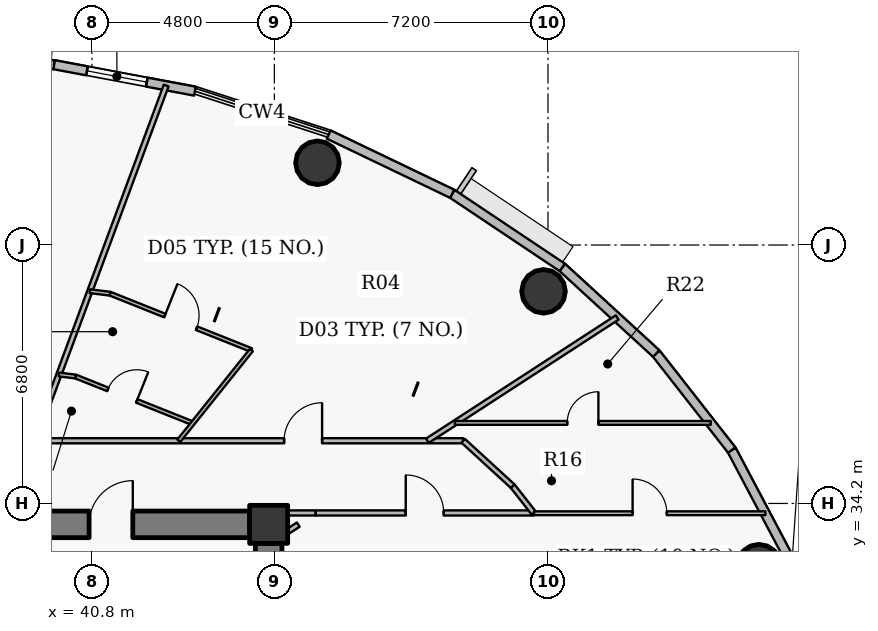
"""IFC4 building model, lengths in metres.
Left out: names, types, materials, properties, quantities, classifications, styles, units other than length and angle.
Written with IfcOpenShell. Run it as: python <this file> out.ifc"""

import sys

from ifc_helpers import new_model, si_unit, direction, frame, frame_2d, origin, origin_2d, place, context, subcontext, project, spatial, rectangle, hollow_circle, extrude, source, transform, mapped, element, fill, save


model = new_model("IFC4")
c1 = context("Model", 3, precision=1e-05, world=origin(), true_north=direction((0.0, 1.0)))
c2 = subcontext(c1, "Body", "Model", "MODEL_VIEW")
j1 = project(units=[si_unit("LENGTHUNIT", "METRE"), si_unit("PLANEANGLEUNIT", "RADIAN")], contexts=[c1])
p1 = place(None, origin())
s1 = spatial("IfcSite", under=j1, at=p1, CompositionType="ELEMENT")
p2 = place(p1, origin())
s2 = spatial("IfcBuilding", under=s1, at=p2, CompositionType="ELEMENT")
p3 = place(p2, frame((0.0, 0.0, 214.05)))
s3 = spatial("IfcBuildingStorey", under=s2, at=p3, CompositionType="ELEMENT", Elevation=214.05)
p4 = place(p3, frame((45.45, 33.65, 0.0), z_axis=(0.0, 0.0, 1.0), x_axis=(1.0, 0.0, 0.0)))
e1 = element("IfcColumn", 1, at=p4, inside=s3, PredefinedType="COLUMN", context=c2, shape_type="SweptSolid", body=[
    extrude(rectangle(XDim=1.0, YDim=1.0, at=origin_2d()), origin(), (0.0, 0.0, 1.0), 3.75),
])
p5 = place(p3, frame((27.05, 33.65, 0.0), z_axis=(0.0, 0.0, 1.0), x_axis=(1.0, 0.0, 0.0)))
e2 = element("IfcWall", 2, at=p5, inside=s3, PredefinedType="SHEAR", context=c2, shape_type="SweptSolid", body=[
    extrude(rectangle(XDim=17.9, YDim=0.7, at=frame_2d((8.95, 0.0))), origin(), (0.0, 0.0, 1.0), 3.05),
])
p6 = place(p5, frame((13.675, 0.0, 0.0)))
e3 = element("IfcOpeningElement", 3, at=p6, cuts=e2, PredefinedType="OPENING", context=c2, shape_type="SweptSolid", body=[
    extrude(rectangle(XDim=1.15, YDim=2.15, at=origin_2d()), frame((0.575, 0.36, 1.075), z_axis=(0.0, -1.0, 0.0), x_axis=(1.0, 0.0, 0.0)), (0.0, 0.0, 1.0), 0.72),
])
p7 = place(p3, frame((45.45, 33.15, 0.0), z_axis=(0.0, 0.0, 1.0), x_axis=(0.0, -1.0, 0.0)))
e4 = element("IfcWall", 4, at=p7, inside=s3, PredefinedType="SHEAR", context=c2, shape_type="SweptSolid", body=[
    extrude(rectangle(XDim=12.3, YDim=0.7, at=frame_2d((6.15, 0.0))), origin(), (0.0, 0.0, 1.0), 3.05),
])
for number, where, z_axis, x_axis in (
    (5, (58.351, 32.549, 0.0), (0.0, 0.0, 1.0), (1.0, 0.0, 0.0)),
    (6, (52.683, 39.781, 0.0), (0.0, 0.0, 1.0), (1.0, 0.0, 0.0)),
    (7, (46.735, 43.164, 0.0), (0.0, 0.0, 1.0), (1.0, 0.0, 0.0)),
):
    element("IfcColumn", number, at=place(p3, frame(where, z_axis=z_axis, x_axis=x_axis)), inside=s3, PredefinedType="COLUMN", context=c2, shape_type="SweptSolid", body=[
        extrude(hollow_circle(Radius=0.575, WallThickness=0.036, at=origin_2d()), origin(), (0.0, 0.0, 1.0), 3.75),
    ])
p8 = place(p3, frame((57.636, 35.605, 0.0), z_axis=(0.0, 0.0, 1.0), x_axis=(0.46766049993, -0.883908172157, 0.0)))
e8 = element("IfcWall", 8, at=p8, inside=s3, PredefinedType="SOLIDWALL", context=c2, shape_type="SweptSolid", body=[
    extrude(rectangle(XDim=3.11, YDim=0.24, at=frame_2d((1.555, 0.0))), origin(), (0.0, 0.0, 1.0), 3.5),
])
p9 = place(p3, frame((55.648, 38.145, 0.0), z_axis=(0.0, 0.0, 1.0), x_axis=(0.616312344705, -0.787501805562, 0.0)))
e9 = element("IfcWall", 9, at=p9, inside=s3, PredefinedType="SOLIDWALL", context=c2, shape_type="SweptSolid", body=[
    extrude(rectangle(XDim=3.225, YDim=0.24, at=frame_2d((1.612, 0.0))), origin(), (0.0, 0.0, 1.0), 3.5),
])
p10 = place(p3, frame((53.176, 40.411, 0.0), z_axis=(0.0, 0.0, 1.0), x_axis=(0.737123922599, -0.675757591694, 0.0)))
e10 = element("IfcWall", 10, at=p10, inside=s3, PredefinedType="SOLIDWALL", context=c2, shape_type="SweptSolid", body=[
    extrude(rectangle(XDim=3.354, YDim=0.24, at=frame_2d((1.677, 0.0))), origin(), (0.0, 0.0, 1.0), 3.5),
])
p11 = place(p3, frame((50.28, 42.348, 0.0), z_axis=(0.0, 0.0, 1.0), x_axis=(0.831262496074, -0.555880079352, 0.0)))
e11 = element("IfcWall", 11, at=p11, inside=s3, PredefinedType="SOLIDWALL", context=c2, shape_type="SweptSolid", body=[
    extrude(rectangle(XDim=3.484, YDim=0.24, at=frame_2d((1.742, 0.0))), origin(), (0.0, 0.0, 1.0), 3.5),
])
p12 = place(p3, frame((47.031, 43.906, 0.0), z_axis=(0.0, 0.0, 1.0), x_axis=(0.901598104751, -0.432574684313, 0.0)))
e12 = element("IfcWall", 12, at=p12, inside=s3, PredefinedType="SOLIDWALL", context=c2, shape_type="SweptSolid", body=[
    extrude(rectangle(XDim=3.604, YDim=0.24, at=frame_2d((1.802, 0.0))), origin(), (0.0, 0.0, 1.0), 3.5),
])
p13 = place(p3, frame((39.802, 45.746, 0.0), z_axis=(0.0, 0.0, 1.0), x_axis=(0.982784898575, -0.184753465822, 0.0)))
e13 = element("IfcWall", 13, at=p13, inside=s3, PredefinedType="SOLIDWALL", context=c2, shape_type="SweptSolid", body=[
    extrude(rectangle(XDim=3.773, YDim=0.24, at=frame_2d((1.886, 0.0))), origin(), (0.0, 0.0, 1.0), 3.5),
])
p14 = place(p13, frame((0.884, 0.0, 0.9)))
e14 = element("IfcOpeningElement", 14, at=p14, cuts=e13, PredefinedType="OPENING", context=c2, shape_type="SweptSolid", body=[
    extrude(rectangle(XDim=1.6, YDim=1.75, at=origin_2d()), frame((0.8, 0.13, 0.875), z_axis=(0.0, -1.0, 0.0), x_axis=(1.0, 0.0, 0.0)), (0.0, 0.0, 1.0), 0.26),
])
p15 = place(p3, frame((36.0, 45.98, 0.0), z_axis=(0.0, 0.0, 1.0), x_axis=(0.998108785312, -0.06147237333, 0.0)))
e15 = element("IfcWall", 15, at=p15, inside=s3, PredefinedType="SOLIDWALL", context=c2, shape_type="SweptSolid", body=[
    extrude(rectangle(XDim=3.809, YDim=0.24, at=frame_2d((1.904, 0.0))), origin(), (0.0, 0.0, 1.0), 3.5),
])
p16 = place(p15, frame((1.379, 0.0, 0.0)))
e16 = element("IfcOpeningElement", 16, at=p16, cuts=e15, PredefinedType="OPENING", context=c2, shape_type="SweptSolid", body=[
    extrude(rectangle(XDim=1.05, YDim=2.15, at=origin_2d()), frame((0.525, 0.13, 1.075), z_axis=(0.0, -1.0, 0.0), x_axis=(1.0, 0.0, 0.0)), (0.0, 0.0, 1.0), 0.26),
])
p17 = place(p3, frame((24.35, 35.85, 0.0), z_axis=(0.0, 0.0, 1.0), x_axis=(1.0, 0.0, 0.0)))
e17 = element("IfcWall", 17, at=p17, inside=s3, PredefinedType="PARTITIONING", context=c2, shape_type="SweptSolid", body=[
    extrude(rectangle(XDim=26.218, YDim=0.135, at=frame_2d((13.109, 0.0))), origin(), (0.0, 0.0, 1.0), 2.935),
])
p18 = place(p17, frame((21.507, 0.0, 0.0)))
e18 = element("IfcOpeningElement", 18, at=p18, cuts=e17, PredefinedType="OPENING", context=c2, shape_type="SweptSolid", body=[
    extrude(rectangle(XDim=1.0, YDim=2.15, at=origin_2d()), frame((0.5, 0.078, 1.075), z_axis=(0.0, -1.0, 0.0), x_axis=(1.0, 0.0, 0.0)), (0.0, 0.0, 1.0), 0.155),
])
p19 = place(p17, frame((12.95, 0.0, 0.0)))
e19 = element("IfcOpeningElement", 19, at=p19, cuts=e17, PredefinedType="OPENING", context=c2, shape_type="SweptSolid", body=[
    extrude(rectangle(XDim=1.0, YDim=2.15, at=origin_2d()), frame((0.5, 0.078, 1.075), z_axis=(0.0, -1.0, 0.0), x_axis=(1.0, 0.0, 0.0)), (0.0, 0.0, 1.0), 0.155),
])
p20 = place(p17, frame((2.293, 0.0, 0.0)))
e20 = element("IfcOpeningElement", 20, at=p20, cuts=e17, PredefinedType="OPENING", context=c2, shape_type="SweptSolid", body=[
    extrude(rectangle(XDim=1.0, YDim=2.15, at=origin_2d()), frame((0.5, 0.078, 1.075), z_axis=(0.0, -1.0, 0.0), x_axis=(1.0, 0.0, 0.0)), (0.0, 0.0, 1.0), 0.155),
])
p21 = place(p3, frame((39.285, 35.85, 0.0), z_axis=(0.0, 0.0, 1.0), x_axis=(0.347978689674, 0.937502443481, 0.0)))
e21 = element("IfcWall", 21, at=p21, inside=s3, PredefinedType="PARTITIONING", context=c2, shape_type="SweptSolid", body=[
    extrude(rectangle(XDim=9.969, YDim=0.135, at=frame_2d((4.984, 0.0))), origin(), (0.0, 0.0, 1.0), 2.985),
])
p22 = place(p3, frame((39.932, 37.593, 0.0), z_axis=(0.0, 0.0, 1.0), x_axis=(0.992412401992, -0.122953748919, 0.0)))
e22 = element("IfcWall", 22, at=p22, inside=s3, PredefinedType="PARTITIONING", context=c2, shape_type="SweptSolid", body=[
    extrude(rectangle(XDim=0.445, YDim=0.1, at=frame_2d((0.222, 0.0))), origin(), (0.0, 0.0, 1.0), 3.5),
])
p23 = place(p3, frame((40.373, 37.539, 0.0), z_axis=(0.0, 0.0, 1.0), x_axis=(0.928801257211, -0.370578230071, 0.0)))
e23 = element("IfcWall", 23, at=p23, inside=s3, PredefinedType="PARTITIONING", context=c2, shape_type="SweptSolid", body=[
    extrude(rectangle(XDim=3.316, YDim=0.1, at=frame_2d((1.658, 0.0))), origin(), (0.0, 0.0, 1.0), 2.935),
])
p24 = place(p23, frame((0.91, 0.0, 0.0)))
e24 = element("IfcOpeningElement", 24, at=p24, cuts=e23, PredefinedType="OPENING", context=c2, shape_type="SweptSolid", body=[
    extrude(rectangle(XDim=0.82, YDim=2.1, at=origin_2d()), frame((0.41, 0.06, 1.05), z_axis=(0.0, -1.0, 0.0), x_axis=(1.0, 0.0, 0.0)), (0.0, 0.0, 1.0), 0.12),
])
p25 = place(p3, frame((40.745, 39.785, 0.0), z_axis=(0.0, 0.0, 1.0), x_axis=(0.992431053699, -0.122803109303, 0.0)))
e25 = element("IfcWall", 25, at=p25, inside=s3, PredefinedType="PARTITIONING", context=c2, shape_type="SweptSolid", body=[
    extrude(rectangle(XDim=0.537, YDim=0.1, at=frame_2d((0.269, 0.0))), origin(), (0.0, 0.0, 1.0), 3.5),
])
p26 = place(p3, frame((41.278, 39.719, 0.0), z_axis=(0.0, 0.0, 1.0), x_axis=(0.928808650267, -0.3705596999, 0.0)))
e26 = element("IfcWall", 26, at=p26, inside=s3, PredefinedType="PARTITIONING", context=c2, shape_type="SweptSolid", body=[
    extrude(rectangle(XDim=4.002, YDim=0.1, at=frame_2d((2.001, 0.0))), origin(), (0.0, 0.0, 1.0), 2.935),
])
p27 = place(p26, frame((1.551, 0.0, 0.0)))
e27 = element("IfcOpeningElement", 27, at=p27, cuts=e26, PredefinedType="OPENING", context=c2, shape_type="SweptSolid", body=[
    extrude(rectangle(XDim=0.9, YDim=2.1, at=origin_2d()), frame((0.45, 0.06, 1.05), z_axis=(0.0, -1.0, 0.0), x_axis=(1.0, 0.0, 0.0)), (0.0, 0.0, 1.0), 0.12),
])
p28 = place(p3, frame((43.085, 35.85, 0.0), z_axis=(0.0, 0.0, 1.0), x_axis=(0.62500673738, 0.780619355531, 0.0)))
e28 = element("IfcWall", 28, at=p28, inside=s3, PredefinedType="PARTITIONING", context=c2, shape_type="SweptSolid", body=[
    extrude(rectangle(XDim=3.056, YDim=0.1, at=frame_2d((1.528, 0.0))), origin(), (0.0, 0.0, 1.0), 3.5),
])
p29 = place(p3, frame((46.691, 33.95, 0.0), z_axis=(0.0, 0.0, 1.0), x_axis=(1.0, 0.0, 0.0)))
e29 = element("IfcWall", 29, at=p29, inside=s3, PredefinedType="PARTITIONING", context=c2, shape_type="SweptSolid", body=[
    extrude(rectangle(XDim=5.733, YDim=0.135, at=frame_2d((2.866, 0.0))), origin(), (0.0, 0.0, 1.0), 3.5),
])
p30 = place(p29, frame((2.366, 0.0, 0.0)))
e30 = element("IfcOpeningElement", 30, at=p30, cuts=e29, PredefinedType="OPENING", context=c2, shape_type="SweptSolid", body=[
    extrude(rectangle(XDim=1.0, YDim=2.15, at=origin_2d()), frame((0.5, 0.078, 1.075), z_axis=(0.0, -1.0, 0.0), x_axis=(1.0, 0.0, 0.0)), (0.0, 0.0, 1.0), 0.155),
])
p31 = place(p3, frame((49.628, 35.85, 0.0), z_axis=(0.0, 0.0, 1.0), x_axis=(0.838688976762, 0.544610686875, 0.0)))
e31 = element("IfcWall", 31, at=p31, inside=s3, PredefinedType="PARTITIONING", context=c2, shape_type="SweptSolid", body=[
    extrude(rectangle(XDim=5.954, YDim=0.135, at=frame_2d((2.977, 0.0))), origin(), (0.0, 0.0, 1.0), 2.985),
])
p32 = place(p3, frame((50.351, 36.319, 0.0), z_axis=(0.0, 0.0, 1.0), x_axis=(1.0, 0.0, 0.0)))
e32 = element("IfcWall", 32, at=p32, inside=s3, PredefinedType="PARTITIONING", context=c2, shape_type="SweptSolid", body=[
    extrude(rectangle(XDim=6.733, YDim=0.1, at=frame_2d((3.366, 0.0))), origin(), (0.0, 0.0, 1.0), 2.985),
])
p33 = place(p32, frame((2.956, 0.0, 0.0)))
e33 = element("IfcOpeningElement", 33, at=p33, cuts=e32, PredefinedType="OPENING", context=c2, shape_type="SweptSolid", body=[
    extrude(rectangle(XDim=0.82, YDim=2.1, at=origin_2d()), frame((0.41, 0.06, 1.05), z_axis=(0.0, -1.0, 0.0), x_axis=(1.0, 0.0, 0.0)), (0.0, 0.0, 1.0), 0.12),
])
p34 = place(p3, frame((50.568, 35.85, 0.0), z_axis=(0.0, 0.0, 1.0), x_axis=(0.737102657331, -0.675780787353, 0.0)))
e34 = element("IfcWall", 34, at=p34, inside=s3, PredefinedType="PARTITIONING", context=c2, shape_type="SweptSolid", body=[
    extrude(rectangle(XDim=1.772, YDim=0.135, at=frame_2d((0.886, 0.0))), origin(), (0.0, 0.0, 1.0), 3.5),
])
p35 = place(p3, frame((51.874, 34.653, 0.0), z_axis=(0.0, 0.0, 1.0), x_axis=(0.61628613448, -0.787522317429, 0.0)))
e35 = element("IfcWall", 35, at=p35, inside=s3, PredefinedType="PARTITIONING", context=c2, shape_type="SweptSolid", body=[
    extrude(rectangle(XDim=0.893, YDim=0.135, at=frame_2d((0.446, 0.0))), origin(), (0.0, 0.0, 1.0), 3.5),
])
p36 = place(p3, frame((52.434, 33.943, 0.0), z_axis=(0.0, 0.0, 1.0), x_axis=(1.0, 0.0, 0.0)))
e36 = element("IfcWall", 36, at=p36, inside=s3, PredefinedType="PARTITIONING", context=c2, shape_type="SweptSolid", body=[
    extrude(rectangle(XDim=6.087, YDim=0.1, at=frame_2d((3.043, 0.0))), origin(), (0.0, 0.0, 1.0), 2.985),
])
p37 = place(p36, frame((2.594, 0.0, 0.0)))
e37 = element("IfcOpeningElement", 37, at=p37, cuts=e36, PredefinedType="OPENING", context=c2, shape_type="SweptSolid", body=[
    extrude(rectangle(XDim=0.9, YDim=2.1, at=origin_2d()), frame((0.45, 0.06, 1.05), z_axis=(0.0, -1.0, 0.0), x_axis=(1.0, 0.0, 0.0)), (0.0, 0.0, 1.0), 0.12),
])
p38 = place(p3, frame((46.681, 33.95, 0.0), z_axis=(0.0, 0.0, 1.0), x_axis=(-1.0, 0.0, 0.0)))
e38 = element("IfcWall", 38, at=p38, inside=s3, PredefinedType="PARTITIONING", context=c2, shape_type="SweptSolid", body=[
    extrude(rectangle(XDim=0.881, YDim=0.135, at=frame_2d((0.44, 0.0))), origin(), (0.0, 0.0, 1.0), 3.5),
])
p39 = place(p3, frame((45.79, 34.0, 0.0), z_axis=(0.0, 0.0, 1.0), x_axis=(-1.0, 0.0, 0.0)))
e39 = element("IfcWall", 39, at=p39, inside=s3, PredefinedType="PARTITIONING", context=c2, shape_type="SweptSolid", body=[
    extrude(rectangle(XDim=0.83, YDim=0.135, at=frame_2d((0.415, 0.0))), origin(), (0.0, 0.0, 1.0), 2.935),
])
p40 = place(p3, frame((45.8, 33.364, 0.0), z_axis=(0.0, 0.0, 1.0), x_axis=(0.838607336961, 0.544736389821, 0.0)))
e40 = element("IfcWall", 40, at=p40, inside=s3, PredefinedType="PARTITIONING", context=c2, shape_type="SweptSolid", body=[
    extrude(rectangle(XDim=0.511, YDim=0.135, at=frame_2d((0.255, 0.0))), origin(), (0.0, 0.0, 1.0), 3.5),
])
m1 = source(origin(), c2, "Body", "SweptSolid", [
    extrude(rectangle(XDim=1.6, YDim=1.75, at=origin_2d()), frame((0.8, 0.03, 0.875), z_axis=(0.0, -1.0, 0.0), x_axis=(1.0, 0.0, 0.0)), (0.0, 0.0, 1.0), 0.06),
])
p41 = place(p14, origin())
e41 = element("IfcWindow", 41, at=p41, inside=s3, PartitioningType="DOUBLE_PANEL_VERTICAL", PredefinedType="WINDOW", context=c2, shape_type="MappedRepresentation", body=[
    mapped(m1, transform((0.0, 0.0, 0.0), x_axis=(1.0, 0.0, 0.0), y_axis=(0.0, 1.0, 0.0), z_axis=(0.0, 0.0, 1.0), scale=1.0)),
])
fill(e14, e41)
m2 = source(origin(), c2, "Body", "SweptSolid", [
    extrude(rectangle(XDim=1.15, YDim=2.15, at=origin_2d()), frame((0.575, 0.025, 1.075), z_axis=(0.0, -1.0, 0.0), x_axis=(1.0, 0.0, 0.0)), (0.0, 0.0, 1.0), 0.05),
])
p42 = place(p6, origin())
e42 = element("IfcDoor", 42, at=p42, inside=s3, OperationType="SINGLE_SWING_RIGHT", PredefinedType="DOOR", context=c2, shape_type="MappedRepresentation", body=[
    mapped(m2, transform((0.0, 0.0, 0.0), x_axis=(1.0, 0.0, 0.0), y_axis=(0.0, 1.0, 0.0), z_axis=(0.0, 0.0, 1.0), scale=1.0)),
])
fill(e3, e42)
m3 = source(origin(), c2, "Body", "SweptSolid", [
    extrude(rectangle(XDim=1.0, YDim=2.15, at=origin_2d()), frame((0.5, 0.025, 1.075), z_axis=(0.0, -1.0, 0.0), x_axis=(1.0, 0.0, 0.0)), (0.0, 0.0, 1.0), 0.05),
])
p43 = place(p18, origin())
e43 = element("IfcDoor", 43, at=p43, inside=s3, OperationType="SINGLE_SWING_RIGHT", PredefinedType="DOOR", context=c2, shape_type="MappedRepresentation", body=[
    mapped(m3, transform((0.0, 0.0, 0.0), x_axis=(1.0, 0.0, 0.0), y_axis=(0.0, 1.0, 0.0), z_axis=(0.0, 0.0, 1.0), scale=1.0)),
])
fill(e18, e43)
m4 = source(origin(), c2, "Body", "SweptSolid", [
    extrude(rectangle(XDim=0.9, YDim=2.1, at=origin_2d()), frame((0.45, 0.025, 1.05), z_axis=(0.0, -1.0, 0.0), x_axis=(1.0, 0.0, 0.0)), (0.0, 0.0, 1.0), 0.05),
])
p44 = place(p27, origin())
e44 = element("IfcDoor", 44, at=p44, inside=s3, OperationType="SINGLE_SWING_LEFT", PredefinedType="DOOR", context=c2, shape_type="MappedRepresentation", body=[
    mapped(m4, transform((0.0, 0.0, 0.0), x_axis=(1.0, 0.0, 0.0), y_axis=(0.0, 1.0, 0.0), z_axis=(0.0, 0.0, 1.0), scale=1.0)),
])
fill(e27, e44)
m5 = source(origin(), c2, "Body", "SweptSolid", [
    extrude(rectangle(XDim=0.82, YDim=2.1, at=origin_2d()), frame((0.41, 0.025, 1.05), z_axis=(0.0, -1.0, 0.0), x_axis=(1.0, 0.0, 0.0)), (0.0, 0.0, 1.0), 0.05),
])
p45 = place(p24, origin())
e45 = element("IfcDoor", 45, at=p45, inside=s3, OperationType="SINGLE_SWING_RIGHT", PredefinedType="DOOR", context=c2, shape_type="MappedRepresentation", body=[
    mapped(m5, transform((0.0, 0.0, 0.0), x_axis=(1.0, 0.0, 0.0), y_axis=(0.0, 1.0, 0.0), z_axis=(0.0, 0.0, 1.0), scale=1.0)),
])
fill(e24, e45)
p46 = place(p30, origin())
e46 = element("IfcDoor", 46, at=p46, inside=s3, OperationType="SINGLE_SWING_LEFT", PredefinedType="DOOR", context=c2, shape_type="MappedRepresentation", body=[
    mapped(m3, transform((0.0, 0.0, 0.0), x_axis=(1.0, 0.0, 0.0), y_axis=(0.0, 1.0, 0.0), z_axis=(0.0, 0.0, 1.0), scale=1.0)),
])
fill(e30, e46)
p47 = place(p37, origin())
e47 = element("IfcDoor", 47, at=p47, inside=s3, OperationType="SINGLE_SWING_LEFT", PredefinedType="DOOR", context=c2, shape_type="MappedRepresentation", body=[
    mapped(m4, transform((0.0, 0.0, 0.0), x_axis=(1.0, 0.0, 0.0), y_axis=(0.0, 1.0, 0.0), z_axis=(0.0, 0.0, 1.0), scale=1.0)),
])
fill(e37, e47)
p48 = place(p33, origin())
e48 = element("IfcDoor", 48, at=p48, inside=s3, OperationType="SINGLE_SWING_RIGHT", PredefinedType="DOOR", context=c2, shape_type="MappedRepresentation", body=[
    mapped(m5, transform((0.0, 0.0, 0.0), x_axis=(1.0, 0.0, 0.0), y_axis=(0.0, 1.0, 0.0), z_axis=(0.0, 0.0, 1.0), scale=1.0)),
])
fill(e33, e48)
save(model, sys.argv[1])
